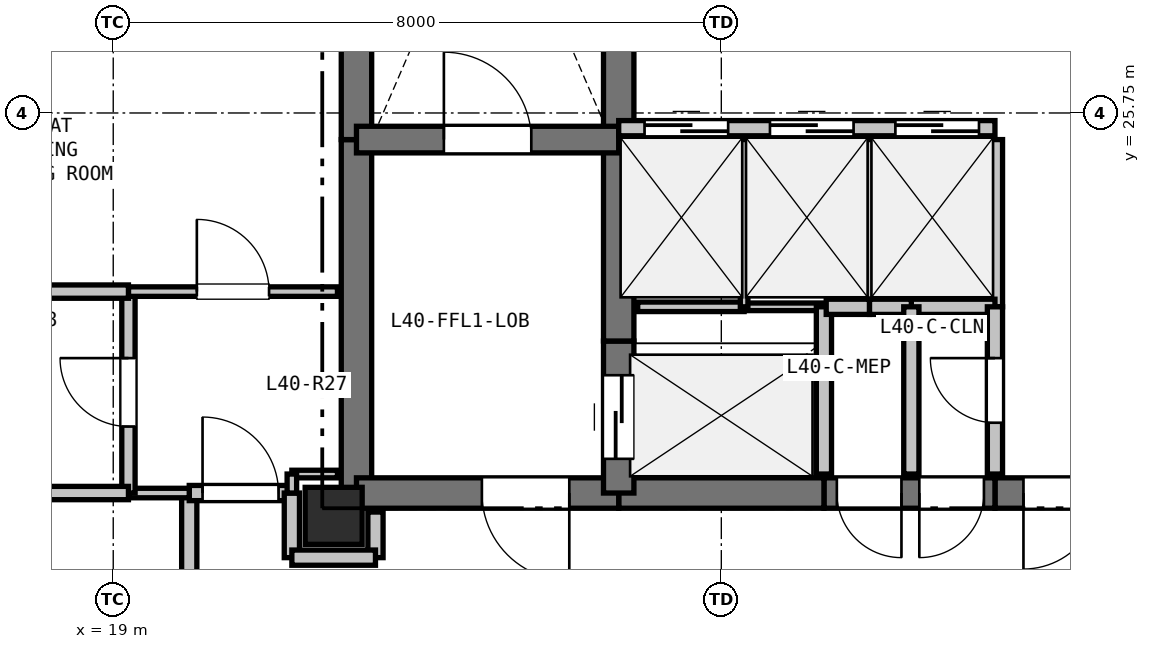
"""IFC4 building model, lengths in metres.
Left out: names, types, materials, properties, quantities, classifications, styles, units other than length and angle.
Written with IfcOpenShell. Run it as: python <this file> out.ifc"""

import sys

from ifc_helpers import new_model, si_unit, direction, frame, frame_2d, origin, origin_2d, place, context, subcontext, project, spatial, rectangle, extrude, element, fill, save


model = new_model("IFC4")
c1 = context("Model", 3, precision=1e-05, world=origin(), true_north=direction((0.0, 1.0)))
c2 = subcontext(c1, "Body", "Model", "MODEL_VIEW")
j1 = project(units=[si_unit("LENGTHUNIT", "METRE"), si_unit("PLANEANGLEUNIT", "RADIAN")], contexts=[c1])
p1 = place(None, origin())
s1 = spatial("IfcSite", under=j1, at=p1, CompositionType="ELEMENT")
p2 = place(p1, origin())
s2 = spatial("IfcBuilding", under=s1, at=p2, CompositionType="ELEMENT")
p3 = place(p2, frame((0.0, 0.0, 144.3)))
s3 = spatial("IfcBuildingStorey", under=s2, at=p3, CompositionType="ELEMENT", Elevation=144.3)
p4 = place(p3, frame((21.9, 20.45, 0.0), z_axis=(0.0, 0.0, 1.0), x_axis=(1.0, 0.0, 0.0)))
e1 = element("IfcColumn", 1, at=p4, inside=s3, PredefinedType="COLUMN", context=c2, shape_type="SweptSolid", body=[
    extrude(rectangle(XDim=0.75, YDim=0.75, at=origin_2d()), origin(), (0.0, 0.0, 1.0), 3.3),
])
p5 = place(p3, frame((22.2, 20.75, 0.0), z_axis=(0.0, 0.0, 1.0), x_axis=(0.0, 1.0, 0.0)))
e2 = element("IfcWall", 2, at=p5, inside=s3, PredefinedType="SHEAR", context=c2, shape_type="SweptSolid", body=[
    extrude(rectangle(XDim=4.65, YDim=0.4, at=frame_2d((2.325, 0.0))), origin(), (0.0, 0.0, 1.0), 3.06),
])
p6 = place(p3, frame((22.2, 25.4, 0.0), z_axis=(0.0, 0.0, 1.0), x_axis=(0.0, 1.0, 0.0)))
e3 = element("IfcWall", 3, at=p6, inside=s3, PredefinedType="SHEAR", context=c2, shape_type="SweptSolid", body=[
    extrude(rectangle(XDim=7.35, YDim=0.4, at=frame_2d((3.675, 0.0))), origin(), (0.0, 0.0, 1.0), 3.06),
])
p7 = place(p3, frame((32.35, 20.75, 0.0), z_axis=(0.0, 0.0, 1.0), x_axis=(-1.0, 0.0, 0.0)))
e4 = element("IfcWall", 4, at=p7, inside=s3, PredefinedType="SHEAR", context=c2, shape_type="SweptSolid", body=[
    extrude(rectangle(XDim=1.75, YDim=0.4, at=frame_2d((0.875, 0.0))), origin(), (0.0, 0.0, 1.0), 3.06),
])
p8 = place(p7, frame((0.375, 0.0, 0.0)))
e5 = element("IfcOpeningElement", 5, at=p8, cuts=e4, PredefinedType="OPENING", context=c2, shape_type="SweptSolid", body=[
    extrude(rectangle(XDim=1.0, YDim=2.15, at=frame_2d((0.5, 1.075))), frame((0.0, 0.21, 0.0), z_axis=(0.0, -1.0, 0.0), x_axis=(1.0, 0.0, 0.0)), (0.0, 0.0, 1.0), 0.42),
])
p9 = place(p3, frame((30.6, 20.75, 0.0), z_axis=(0.0, 0.0, 1.0), x_axis=(-1.0, 0.0, 0.0)))
e6 = element("IfcWall", 6, at=p9, inside=s3, PredefinedType="SHEAR", context=c2, shape_type="SweptSolid", body=[
    extrude(rectangle(XDim=2.25, YDim=0.4, at=frame_2d((1.125, 0.0))), origin(), (0.0, 0.0, 1.0), 3.06),
])
p10 = place(p9, frame((1.23, 0.0, 0.0)))
e7 = element("IfcOpeningElement", 7, at=p10, cuts=e6, PredefinedType="OPENING", context=c2, shape_type="SweptSolid", body=[
    extrude(rectangle(XDim=0.85, YDim=2.1, at=frame_2d((0.425, 1.05))), frame((0.0, 0.21, 0.0), z_axis=(0.0, -1.0, 0.0), x_axis=(1.0, 0.0, 0.0)), (0.0, 0.0, 1.0), 0.42),
])
p11 = place(p9, frame((0.145, 0.0, 0.0)))
e8 = element("IfcOpeningElement", 8, at=p11, cuts=e6, PredefinedType="OPENING", context=c2, shape_type="SweptSolid", body=[
    extrude(rectangle(XDim=0.85, YDim=2.1, at=frame_2d((0.425, 1.05))), frame((0.0, 0.21, 0.0), z_axis=(0.0, -1.0, 0.0), x_axis=(1.0, 0.0, 0.0)), (0.0, 0.0, 1.0), 0.42),
])
p12 = place(p3, frame((28.35, 20.75, 0.0), z_axis=(0.0, 0.0, 1.0), x_axis=(-1.0, 0.0, 0.0)))
e9 = element("IfcWall", 9, at=p12, inside=s3, PredefinedType="SHEAR", context=c2, shape_type="SweptSolid", body=[
    extrude(rectangle(XDim=2.7, YDim=0.4, at=frame_2d((1.35, 0.0))), origin(), (0.0, 0.0, 1.0), 3.06),
])
p13 = place(p3, frame((25.65, 20.75, 0.0), z_axis=(0.0, 0.0, 1.0), x_axis=(-1.0, 0.0, 0.0)))
e10 = element("IfcWall", 10, at=p13, inside=s3, PredefinedType="SHEAR", context=c2, shape_type="SweptSolid", body=[
    extrude(rectangle(XDim=3.45, YDim=0.4, at=frame_2d((1.725, 0.0))), origin(), (0.0, 0.0, 1.0), 3.06),
])
p14 = place(p13, frame((0.65, 0.0, 0.0)))
e11 = element("IfcOpeningElement", 11, at=p14, cuts=e10, PredefinedType="OPENING", context=c2, shape_type="SweptSolid", body=[
    extrude(rectangle(XDim=1.15, YDim=2.15, at=frame_2d((0.575, 1.075))), frame((0.0, 0.21, 0.0), z_axis=(0.0, -1.0, 0.0), x_axis=(1.0, 0.0, 0.0)), (0.0, 0.0, 1.0), 0.42),
])
p15 = place(p3, frame((25.65, 20.75, 0.0), z_axis=(0.0, 0.0, 1.0), x_axis=(0.0, 1.0, 0.0)))
e12 = element("IfcWall", 12, at=p15, inside=s3, PredefinedType="SHEAR", context=c2, shape_type="SweptSolid", body=[
    extrude(rectangle(XDim=2.0, YDim=0.4, at=frame_2d((1.0, 0.0))), origin(), (0.0, 0.0, 1.0), 3.06),
])
p16 = place(p15, frame((0.45, 0.0, 0.0)))
e13 = element("IfcOpeningElement", 13, at=p16, cuts=e12, PredefinedType="OPENING", context=c2, shape_type="SweptSolid", body=[
    extrude(rectangle(XDim=1.1, YDim=2.15, at=frame_2d((0.55, 1.075))), frame((0.0, 0.21, 0.0), z_axis=(0.0, -1.0, 0.0), x_axis=(1.0, 0.0, 0.0)), (0.0, 0.0, 1.0), 0.42),
])
p17 = place(p3, frame((25.65, 22.75, 0.0), z_axis=(0.0, 0.0, 1.0), x_axis=(0.0, 1.0, 0.0)))
e14 = element("IfcWall", 14, at=p17, inside=s3, PredefinedType="SHEAR", context=c2, shape_type="SweptSolid", body=[
    extrude(rectangle(XDim=2.8, YDim=0.4, at=frame_2d((1.4, 0.0))), origin(), (0.0, 0.0, 1.0), 3.06),
])
p18 = place(p3, frame((25.65, 25.55, 0.0), z_axis=(0.0, 0.0, 1.0), x_axis=(0.0, 1.0, 0.0)))
e15 = element("IfcWall", 15, at=p18, inside=s3, PredefinedType="SHEAR", context=c2, shape_type="SweptSolid", body=[
    extrude(rectangle(XDim=2.4, YDim=0.4, at=frame_2d((1.2, 0.0))), origin(), (0.0, 0.0, 1.0), 3.06),
])
p19 = place(p3, frame((22.2, 25.4, 0.0), z_axis=(0.0, 0.0, 1.0), x_axis=(1.0, 0.0, 0.0)))
e16 = element("IfcWall", 16, at=p19, inside=s3, PredefinedType="SHEAR", context=c2, shape_type="SweptSolid", body=[
    extrude(rectangle(XDim=3.45, YDim=0.35, at=frame_2d((1.725, 0.0))), origin(), (0.0, 0.0, 1.0), 3.06),
])
p20 = place(p19, frame((1.15, 0.0, 0.0)))
e17 = element("IfcOpeningElement", 17, at=p20, cuts=e16, PredefinedType="OPENING", context=c2, shape_type="SweptSolid", body=[
    extrude(rectangle(XDim=1.15, YDim=2.15, at=frame_2d((0.575, 1.075))), frame((0.0, 0.185, 0.0), z_axis=(0.0, -1.0, 0.0), x_axis=(1.0, 0.0, 0.0)), (0.0, 0.0, 1.0), 0.37),
])
p21 = place(p3, frame((25.65, 25.55, 0.0), z_axis=(0.0, 0.0, 1.0), x_axis=(1.0, 0.0, 0.0)))
e18 = element("IfcWall", 18, at=p21, inside=s3, PredefinedType="PARTITIONING", context=c2, shape_type="SweptSolid", body=[
    extrude(rectangle(XDim=4.95, YDim=0.2, at=frame_2d((2.475, 0.0))), origin(), (0.0, 0.0, 1.0), 3.06),
])
p22 = place(p21, frame((0.34, 0.0, 0.0)))
e19 = element("IfcOpeningElement", 19, at=p22, cuts=e18, PredefinedType="OPENING", context=c2, shape_type="SweptSolid", body=[
    extrude(rectangle(XDim=1.1, YDim=2.15, at=frame_2d((0.55, 1.075))), frame((0.0, 0.11, 0.0), z_axis=(0.0, -1.0, 0.0), x_axis=(1.0, 0.0, 0.0)), (0.0, 0.0, 1.0), 0.22),
])
p23 = place(p21, frame((1.99, 0.0, 0.0)))
e20 = element("IfcOpeningElement", 20, at=p23, cuts=e18, PredefinedType="OPENING", context=c2, shape_type="SweptSolid", body=[
    extrude(rectangle(XDim=1.1, YDim=2.15, at=frame_2d((0.55, 1.075))), frame((0.0, 0.11, 0.0), z_axis=(0.0, -1.0, 0.0), x_axis=(1.0, 0.0, 0.0)), (0.0, 0.0, 1.0), 0.22),
])
p24 = place(p21, frame((3.64, 0.0, 0.0)))
e21 = element("IfcOpeningElement", 21, at=p24, cuts=e18, PredefinedType="OPENING", context=c2, shape_type="SweptSolid", body=[
    extrude(rectangle(XDim=1.1, YDim=2.15, at=frame_2d((0.55, 1.075))), frame((0.0, 0.11, 0.0), z_axis=(0.0, -1.0, 0.0), x_axis=(1.0, 0.0, 0.0)), (0.0, 0.0, 1.0), 0.22),
])
p25 = place(p3, frame((25.9, 23.2, 0.0), z_axis=(0.0, 0.0, 1.0), x_axis=(1.0, 0.0, 0.0)))
e22 = element("IfcWall", 22, at=p25, inside=s3, PredefinedType="PARTITIONING", context=c2, shape_type="SweptSolid", body=[
    extrude(rectangle(XDim=1.4, YDim=0.125, at=frame_2d((0.7, 0.0))), origin(), (0.0, 0.0, 1.0), 3.06),
])
p26 = place(p3, frame((27.3, 23.2, 0.0), z_axis=(0.0, 0.0, 1.0), x_axis=(1.0, 0.0, 0.0)))
e23 = element("IfcWall", 23, at=p26, inside=s3, PredefinedType="PARTITIONING", context=c2, shape_type="SweptSolid", body=[
    extrude(rectangle(XDim=1.05, YDim=0.1, at=frame_2d((0.525, 0.0))), origin(), (0.0, 0.0, 1.0), 3.06),
])
p27 = place(p3, frame((28.35, 23.2, 0.0), z_axis=(0.0, 0.0, 1.0), x_axis=(0.0, -1.0, 0.0)))
e24 = element("IfcWall", 24, at=p27, inside=s3, PredefinedType="PARTITIONING", context=c2, shape_type="SweptSolid", body=[
    extrude(rectangle(XDim=2.2, YDim=0.2, at=frame_2d((1.1, 0.0))), origin(), (0.0, 0.0, 1.0), 3.06),
])
p28 = place(p3, frame((27.3, 25.4, 0.0), z_axis=(0.0, 0.0, 1.0), x_axis=(0.0, -1.0, 0.0)))
e25 = element("IfcWall", 25, at=p28, inside=s3, PredefinedType="PARTITIONING", context=c2, shape_type="SweptSolid", body=[
    extrude(rectangle(XDim=2.2, YDim=0.1, at=frame_2d((1.1, 0.0))), origin(), (0.0, 0.0, 1.0), 3.06),
])
p29 = place(p3, frame((28.95, 25.4, 0.0), z_axis=(0.0, 0.0, 1.0), x_axis=(0.0, -1.0, 0.0)))
e26 = element("IfcWall", 26, at=p29, inside=s3, PredefinedType="PARTITIONING", context=c2, shape_type="SweptSolid", body=[
    extrude(rectangle(XDim=2.2, YDim=0.125, at=frame_2d((1.1, 0.0))), origin(), (0.0, 0.0, 1.0), 3.06),
])
p30 = place(p3, frame((28.95, 23.2, 0.0), z_axis=(0.0, 0.0, 1.0), x_axis=(-1.0, 0.0, 0.0)))
e27 = element("IfcWall", 27, at=p30, inside=s3, PredefinedType="PARTITIONING", context=c2, shape_type="SweptSolid", body=[
    extrude(rectangle(XDim=0.57, YDim=0.2, at=frame_2d((0.285, 0.0))), origin(), (0.0, 0.0, 1.0), 3.06),
])
p31 = place(p3, frame((30.6, 25.4, 0.0), z_axis=(0.0, 0.0, 1.0), x_axis=(0.0, -1.0, 0.0)))
e28 = element("IfcWall", 28, at=p31, inside=s3, PredefinedType="PARTITIONING", context=c2, shape_type="SweptSolid", body=[
    extrude(rectangle(XDim=2.2, YDim=0.2, at=frame_2d((1.1, 0.0))), origin(), (0.0, 0.0, 1.0), 3.06),
])
p32 = place(p3, frame((30.6, 23.2, 0.0), z_axis=(0.0, 0.0, 1.0), x_axis=(-1.0, 0.0, 0.0)))
e29 = element("IfcWall", 29, at=p32, inside=s3, PredefinedType="PARTITIONING", context=c2, shape_type="SweptSolid", body=[
    extrude(rectangle(XDim=1.1, YDim=0.2, at=frame_2d((0.55, 0.0))), origin(), (0.0, 0.0, 1.0), 3.06),
])
p33 = place(p3, frame((29.5, 23.2, 0.0), z_axis=(0.0, 0.0, 1.0), x_axis=(-1.0, 0.0, 0.0)))
e30 = element("IfcWall", 30, at=p33, inside=s3, PredefinedType="PARTITIONING", context=c2, shape_type="SweptSolid", body=[
    extrude(rectangle(XDim=0.55, YDim=0.2, at=frame_2d((0.275, 0.0))), origin(), (0.0, 0.0, 1.0), 3.06),
])
p34 = place(p3, frame((30.6, 21.0, 0.0), z_axis=(0.0, 0.0, 1.0), x_axis=(0.0, 1.0, 0.0)))
e31 = element("IfcWall", 31, at=p34, inside=s3, PredefinedType="PARTITIONING", context=c2, shape_type="SweptSolid", body=[
    extrude(rectangle(XDim=2.2, YDim=0.2, at=frame_2d((1.1, 0.0))), origin(), (0.0, 0.0, 1.0), 3.06),
])
p35 = place(p34, frame((0.675, 0.0, 0.0)))
e32 = element("IfcOpeningElement", 32, at=p35, cuts=e31, PredefinedType="OPENING", context=c2, shape_type="SweptSolid", body=[
    extrude(rectangle(XDim=0.85, YDim=2.1, at=frame_2d((0.425, 1.05))), frame((0.0, 0.11, 0.0), z_axis=(0.0, -1.0, 0.0), x_axis=(1.0, 0.0, 0.0)), (0.0, 0.0, 1.0), 0.22),
])
p36 = place(p3, frame((22.45, 19.9, 0.0), z_axis=(0.0, 0.0, 1.0), x_axis=(0.0, 1.0, 0.0)))
e33 = element("IfcWall", 33, at=p36, inside=s3, PredefinedType="PARTITIONING", context=c2, shape_type="SweptSolid", body=[
    extrude(rectangle(XDim=0.6, YDim=0.2, at=frame_2d((0.3, 0.0))), origin(), (0.0, 0.0, 1.0), 2.433),
])
p37 = place(p3, frame((20.0, 18.15, 0.0), z_axis=(0.0, 0.0, 1.0), x_axis=(0.0, 1.0, 0.0)))
e34 = element("IfcWall", 34, at=p37, inside=s3, PredefinedType="PARTITIONING", context=c2, shape_type="SweptSolid", body=[
    extrude(rectangle(XDim=2.6, YDim=0.2, at=frame_2d((1.3, 0.0))), origin(), (0.0, 0.0, 1.0), 3.06),
])
p38 = place(p3, frame((20.0, 20.75, 0.0), z_axis=(0.0, 0.0, 1.0), x_axis=(1.0, 0.0, 0.0)))
e35 = element("IfcWall", 35, at=p38, inside=s3, PredefinedType="PARTITIONING", context=c2, shape_type="SweptSolid", body=[
    extrude(rectangle(XDim=1.35, YDim=0.2, at=frame_2d((0.675, 0.0))), origin(), (0.0, 0.0, 1.0), 2.433),
])
p39 = place(p38, frame((0.175, 0.0, 0.0)))
e36 = element("IfcOpeningElement", 36, at=p39, cuts=e35, PredefinedType="OPENING", context=c2, shape_type="SweptSolid", body=[
    extrude(rectangle(XDim=1.0, YDim=2.15, at=frame_2d((0.5, 1.075))), frame((0.0, 0.11, 0.0), z_axis=(0.0, -1.0, 0.0), x_axis=(1.0, 0.0, 0.0)), (0.0, 0.0, 1.0), 0.22),
])
p40 = place(p3, frame((21.35, 20.75, 0.0), z_axis=(0.0, 0.0, 1.0), x_axis=(0.0, -1.0, 0.0)))
e37 = element("IfcWall", 37, at=p40, inside=s3, PredefinedType="PARTITIONING", context=c2, shape_type="SweptSolid", body=[
    extrude(rectangle(XDim=0.85, YDim=0.2, at=frame_2d((0.425, 0.0))), origin(), (0.0, 0.0, 1.0), 2.433),
])
p41 = place(p3, frame((21.35, 19.9, 0.0), z_axis=(0.0, 0.0, 1.0), x_axis=(1.0, 0.0, 0.0)))
e38 = element("IfcWall", 38, at=p41, inside=s3, PredefinedType="PARTITIONING", context=c2, shape_type="SweptSolid", body=[
    extrude(rectangle(XDim=1.1, YDim=0.2, at=frame_2d((0.55, 0.0))), origin(), (0.0, 0.0, 1.0), 2.433),
])
p42 = place(p3, frame((20.0, 20.75, 0.0), z_axis=(0.0, 0.0, 1.0), x_axis=(-1.0, 0.0, 0.0)))
e39 = element("IfcWall", 39, at=p42, inside=s3, PredefinedType="PARTITIONING", context=c2, shape_type="SweptSolid", body=[
    extrude(rectangle(XDim=0.8, YDim=0.125, at=frame_2d((0.4, 0.0))), origin(), (0.0, 0.0, 1.0), 3.06),
])
p43 = place(p3, frame((19.2, 20.75, 0.0), z_axis=(0.0, 0.0, 1.0), x_axis=(0.0, 1.0, 0.0)))
e40 = element("IfcWall", 40, at=p43, inside=s3, PredefinedType="PLUMBINGWALL", context=c2, shape_type="SweptSolid", body=[
    extrude(rectangle(XDim=2.65, YDim=0.175, at=frame_2d((1.325, 0.0))), origin(), (0.0, 0.0, 1.0), 2.433),
])
p44 = place(p43, frame((0.875, 0.0, 0.0)))
e41 = element("IfcOpeningElement", 41, at=p44, cuts=e40, PredefinedType="OPENING", context=c2, shape_type="SweptSolid", body=[
    extrude(rectangle(XDim=0.9, YDim=2.1, at=frame_2d((0.45, 1.05))), frame((0.0, 0.097, 0.0), z_axis=(0.0, -1.0, 0.0), x_axis=(1.0, 0.0, 0.0)), (0.0, 0.0, 1.0), 0.195),
])
p45 = place(p3, frame((19.2, 23.4, 0.0), z_axis=(0.0, 0.0, 1.0), x_axis=(1.0, 0.0, 0.0)))
e42 = element("IfcWall", 42, at=p45, inside=s3, PredefinedType="PARTITIONING", context=c2, shape_type="SweptSolid", body=[
    extrude(rectangle(XDim=2.75, YDim=0.125, at=frame_2d((1.375, 0.0))), origin(), (0.0, 0.0, 1.0), 2.585),
])
p46 = place(p45, frame((0.9, 0.0, 0.0)))
e43 = element("IfcOpeningElement", 43, at=p46, cuts=e42, PredefinedType="OPENING", context=c2, shape_type="SweptSolid", body=[
    extrude(rectangle(XDim=0.95, YDim=2.1, at=frame_2d((0.475, 1.05))), frame((0.0, 0.073, 0.0), z_axis=(0.0, -1.0, 0.0), x_axis=(1.0, 0.0, 0.0)), (0.0, 0.0, 1.0), 0.145),
])
p47 = place(p3, frame((21.95, 21.0, 0.0), z_axis=(0.0, 0.0, 1.0), x_axis=(-1.0, 0.0, 0.0)))
e44 = element("IfcWall", 44, at=p47, inside=s3, PredefinedType="PARTITIONING", context=c2, shape_type="SweptSolid", body=[
    extrude(rectangle(XDim=0.6, YDim=0.1, at=frame_2d((0.3, 0.0))), origin(), (0.0, 0.0, 1.0), 2.585),
])
p48 = place(p3, frame((21.35, 21.0, 0.0), z_axis=(0.0, 0.0, 1.0), x_axis=(0.0, -1.0, 0.0)))
e45 = element("IfcWall", 45, at=p48, inside=s3, PredefinedType="PARTITIONING", context=c2, shape_type="SweptSolid", body=[
    extrude(rectangle(XDim=0.25, YDim=0.125, at=frame_2d((0.125, 0.0))), origin(), (0.0, 0.0, 1.0), 3.06),
])
for number, where, z_axis, x_axis in (
    (46, (17.0, 23.4, 0.0), (0.0, 0.0, 1.0), (1.0, 0.0, 0.0)),
    (47, (19.2, 20.75, 0.0), (0.0, 0.0, 1.0), (-1.0, 0.0, 0.0)),
):
    element("IfcWall", number, at=place(p3, frame(where, z_axis=z_axis, x_axis=x_axis)), inside=s3, PredefinedType="PLUMBINGWALL", context=c2, shape_type="SweptSolid", body=[
        extrude(rectangle(XDim=2.2, YDim=0.175, at=frame_2d((1.1, 0.0))), origin(), (0.0, 0.0, 1.0), 3.06),
    ])
p49 = place(p3, frame((29.5, 23.2, 0.0), z_axis=(0.0, 0.0, 1.0), x_axis=(0.0, -1.0, 0.0)))
e48 = element("IfcWall", 48, at=p49, inside=s3, PredefinedType="PARTITIONING", context=c2, shape_type="SweptSolid", body=[
    extrude(rectangle(XDim=2.2, YDim=0.2, at=frame_2d((1.1, 0.0))), origin(), (0.0, 0.0, 1.0), 3.06),
])
p50 = place(p22, origin())
e49 = element("IfcDoor", 49, at=p50, inside=s3, OperationType="SLIDING_TO_LEFT", PredefinedType="DOOR", context=c2, shape_type="SweptSolid", body=[
    extrude(rectangle(XDim=1.1, YDim=2.15, at=frame_2d((0.55, 1.075))), frame((0.0, 0.025, 0.0), z_axis=(0.0, -1.0, 0.0), x_axis=(1.0, 0.0, 0.0)), (0.0, 0.0, 1.0), 0.05),
])
fill(e19, e49)
p51 = place(p23, origin())
e50 = element("IfcDoor", 50, at=p51, inside=s3, OperationType="SLIDING_TO_LEFT", PredefinedType="DOOR", context=c2, shape_type="SweptSolid", body=[
    extrude(rectangle(XDim=1.1, YDim=2.15, at=frame_2d((0.55, 1.075))), frame((0.0, 0.025, 0.0), z_axis=(0.0, -1.0, 0.0), x_axis=(1.0, 0.0, 0.0)), (0.0, 0.0, 1.0), 0.05),
])
fill(e20, e50)
p52 = place(p24, origin())
e51 = element("IfcDoor", 51, at=p52, inside=s3, OperationType="SLIDING_TO_LEFT", PredefinedType="DOOR", context=c2, shape_type="SweptSolid", body=[
    extrude(rectangle(XDim=1.1, YDim=2.15, at=frame_2d((0.55, 1.075))), frame((0.0, 0.025, 0.0), z_axis=(0.0, -1.0, 0.0), x_axis=(1.0, 0.0, 0.0)), (0.0, 0.0, 1.0), 0.05),
])
fill(e21, e51)
p53 = place(p8, origin())
e52 = element("IfcDoor", 52, at=p53, inside=s3, OperationType="SINGLE_SWING_RIGHT", PredefinedType="DOOR", context=c2, shape_type="SweptSolid", body=[
    extrude(rectangle(XDim=1.0, YDim=2.15, at=frame_2d((0.5, 1.075))), frame((0.0, 0.025, 0.0), z_axis=(0.0, -1.0, 0.0), x_axis=(1.0, 0.0, 0.0)), (0.0, 0.0, 1.0), 0.05),
])
fill(e5, e52)
p54 = place(p16, origin())
e53 = element("IfcDoor", 53, at=p54, inside=s3, OperationType="SLIDING_TO_LEFT", PredefinedType="DOOR", context=c2, shape_type="SweptSolid", body=[
    extrude(rectangle(XDim=1.1, YDim=2.15, at=frame_2d((0.55, 1.075))), frame((0.0, 0.025, 0.0), z_axis=(0.0, -1.0, 0.0), x_axis=(1.0, 0.0, 0.0)), (0.0, 0.0, 1.0), 0.05),
])
fill(e13, e53)
p55 = place(p20, origin())
e54 = element("IfcDoor", 54, at=p55, inside=s3, OperationType="SINGLE_SWING_LEFT", PredefinedType="DOOR", context=c2, shape_type="SweptSolid", body=[
    extrude(rectangle(XDim=1.15, YDim=2.15, at=frame_2d((0.575, 1.075))), frame((0.0, 0.025, 0.0), z_axis=(0.0, -1.0, 0.0), x_axis=(1.0, 0.0, 0.0)), (0.0, 0.0, 1.0), 0.05),
])
fill(e17, e54)
p56 = place(p14, origin())
e55 = element("IfcDoor", 55, at=p56, inside=s3, OperationType="SINGLE_SWING_LEFT", PredefinedType="DOOR", context=c2, shape_type="SweptSolid", body=[
    extrude(rectangle(XDim=1.15, YDim=2.15, at=frame_2d((0.575, 1.075))), frame((0.0, 0.025, 0.0), z_axis=(0.0, -1.0, 0.0), x_axis=(1.0, 0.0, 0.0)), (0.0, 0.0, 1.0), 0.05),
])
fill(e11, e55)
p57 = place(p35, origin())
e56 = element("IfcDoor", 56, at=p57, inside=s3, OperationType="SINGLE_SWING_RIGHT", PredefinedType="DOOR", context=c2, shape_type="SweptSolid", body=[
    extrude(rectangle(XDim=0.85, YDim=2.1, at=frame_2d((0.425, 1.05))), frame((0.0, 0.025, 0.0), z_axis=(0.0, -1.0, 0.0), x_axis=(1.0, 0.0, 0.0)), (0.0, 0.0, 1.0), 0.05),
])
fill(e32, e56)
p58 = place(p39, origin())
e57 = element("IfcDoor", 57, at=p58, inside=s3, OperationType="SINGLE_SWING_LEFT", PredefinedType="DOOR", context=c2, shape_type="SweptSolid", body=[
    extrude(rectangle(XDim=1.0, YDim=2.15, at=frame_2d((0.5, 1.075))), frame((0.0, 0.025, 0.0), z_axis=(0.0, -1.0, 0.0), x_axis=(1.0, 0.0, 0.0)), (0.0, 0.0, 1.0), 0.05),
])
fill(e36, e57)
p59 = place(p10, origin())
e58 = element("IfcDoor", 58, at=p59, inside=s3, OperationType="SINGLE_SWING_LEFT", PredefinedType="DOOR", context=c2, shape_type="SweptSolid", body=[
    extrude(rectangle(XDim=0.85, YDim=2.1, at=frame_2d((0.425, 1.05))), frame((0.0, 0.025, 0.0), z_axis=(0.0, -1.0, 0.0), x_axis=(1.0, 0.0, 0.0)), (0.0, 0.0, 1.0), 0.05),
])
fill(e7, e58)
p60 = place(p11, origin())
e59 = element("IfcDoor", 59, at=p60, inside=s3, OperationType="SINGLE_SWING_RIGHT", PredefinedType="DOOR", context=c2, shape_type="SweptSolid", body=[
    extrude(rectangle(XDim=0.85, YDim=2.1, at=frame_2d((0.425, 1.05))), frame((0.0, 0.025, 0.0), z_axis=(0.0, -1.0, 0.0), x_axis=(1.0, 0.0, 0.0)), (0.0, 0.0, 1.0), 0.05),
])
fill(e8, e59)
p61 = place(p44, origin())
e60 = element("IfcDoor", 60, at=p61, inside=s3, OperationType="SINGLE_SWING_RIGHT", PredefinedType="DOOR", context=c2, shape_type="SweptSolid", body=[
    extrude(rectangle(XDim=0.9, YDim=2.1, at=frame_2d((0.45, 1.05))), frame((0.0, 0.025, 0.0), z_axis=(0.0, -1.0, 0.0), x_axis=(1.0, 0.0, 0.0)), (0.0, 0.0, 1.0), 0.05),
])
fill(e41, e60)
p62 = place(p46, origin())
e61 = element("IfcDoor", 61, at=p62, inside=s3, OperationType="SINGLE_SWING_LEFT", PredefinedType="DOOR", context=c2, shape_type="SweptSolid", body=[
    extrude(rectangle(XDim=0.95, YDim=2.1, at=frame_2d((0.475, 1.05))), frame((0.0, 0.025, 0.0), z_axis=(0.0, -1.0, 0.0), x_axis=(1.0, 0.0, 0.0)), (0.0, 0.0, 1.0), 0.05),
])
fill(e43, e61)
save(model, sys.argv[1])
